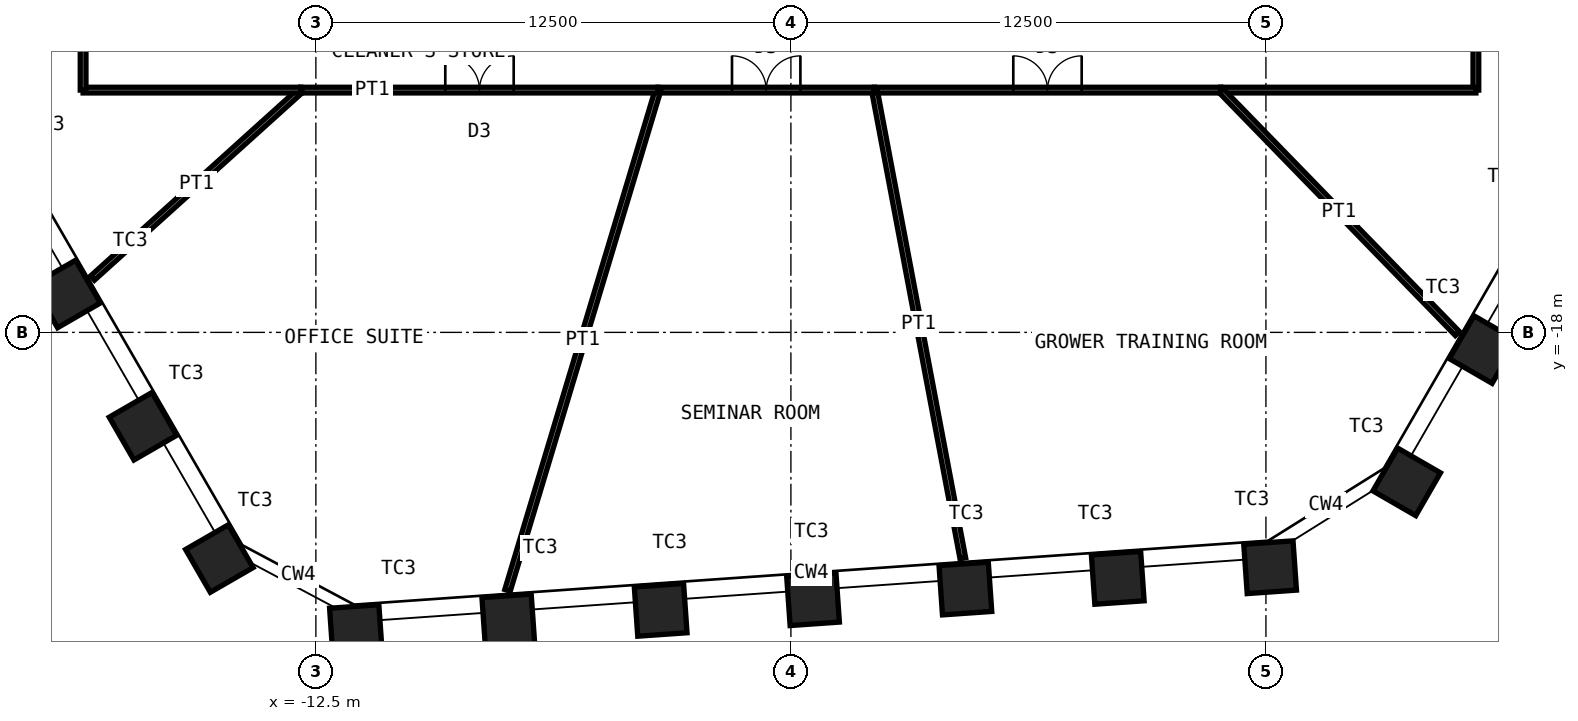
"""IFC4 building model, lengths in metres.
Left out: names, types, materials, properties, quantities, classifications, styles, units other than length and angle.
Written with IfcOpenShell. Run it as: python <this file> out.ifc"""

import sys

from ifc_helpers import new_model, si_unit, direction, frame, frame_2d, origin, origin_2d, place, context, subcontext, project, spatial, rectangle, hollow_rectangle, extrude, element, fill, save


model = new_model("IFC4")
c1 = context("Model", 3, precision=1e-05, world=origin(), true_north=direction((0.0, 1.0)))
c2 = subcontext(c1, "Body", "Model", "MODEL_VIEW")
j1 = project(units=[si_unit("LENGTHUNIT", "METRE"), si_unit("PLANEANGLEUNIT", "RADIAN")], contexts=[c1])
p1 = place(None, origin())
s1 = spatial("IfcSite", under=j1, at=p1, CompositionType="ELEMENT")
p2 = place(p1, origin())
s2 = spatial("IfcBuilding", under=s1, at=p2, CompositionType="ELEMENT")
p3 = place(p2, frame((0.0, 0.0, 132.4)))
s3 = spatial("IfcBuildingStorey", under=s2, at=p3, CompositionType="ELEMENT", Elevation=132.4)
for number, where, z_axis, x_axis in (
    (1, (18.214, -18.453, 0.0), (0.0, 0.0, 1.0), (0.5, 0.866, 0.0)),
    (2, (16.204, -21.933, 0.0), (0.0, 0.0, 1.0), (0.5, 0.866, 0.0)),
    (3, (12.61, -24.179, 0.0), (0.0, 0.0, 1.0), (0.998, 0.07, 0.0)),
    (4, (8.601, -24.46, 0.0), (0.0, 0.0, 1.0), (0.998, 0.07, 0.0)),
    (5, (4.592, -24.74, 0.0), (0.0, 0.0, 1.0), (0.998, 0.07, 0.0)),
    (6, (0.582, -25.02, 0.0), (0.0, 0.0, 1.0), (0.998, 0.07, 0.0)),
    (7, (-3.427, -25.301, 0.0), (0.0, 0.0, 1.0), (0.998, 0.07, 0.0)),
    (8, (-7.436, -25.581, 0.0), (0.0, 0.0, 1.0), (0.998, 0.07, 0.0)),
    (9, (-11.446, -25.861, 0.0), (0.0, 0.0, 1.0), (0.998, 0.07, 0.0)),
    (10, (-15.04, -23.95, 0.0), (0.0, 0.0, 1.0), (0.5, -0.866, 0.0)),
    (11, (-17.049, -20.47, 0.0), (0.0, 0.0, 1.0), (0.5, -0.866, 0.0)),
    (12, (-19.059, -16.989, 0.0), (0.0, 0.0, 1.0), (0.5, -0.866, 0.0)),
):
    element("IfcColumn", number, at=place(p3, frame(where, z_axis=z_axis, x_axis=x_axis)), inside=s3, PredefinedType="COLUMN", context=c2, shape_type="SweptSolid", body=[
        extrude(hollow_rectangle(XDim=1.3, YDim=1.3, WallThickness=0.1, at=origin_2d()), origin(), (0.0, 0.0, 1.0), 4.2),
    ])
p4 = place(p3, frame((18.025, 4.247, 0.0), z_axis=(0.0, 0.0, 1.0), x_axis=(0.0, -1.0, 0.0)))
e13 = element("IfcWall", 13, at=p4, inside=s3, PredefinedType="PARTITIONING", context=c2, shape_type="SweptSolid", body=[
    extrude(rectangle(XDim=15.872, YDim=0.15, at=frame_2d((7.936, 0.0))), origin(), (0.0, 0.0, 1.0), 4.03),
])
p5 = place(p4, frame((7.036, 0.0, 0.0)))
e14 = element("IfcOpeningElement", 14, at=p5, cuts=e13, PredefinedType="OPENING", context=c2, shape_type="SweptSolid", body=[
    extrude(rectangle(XDim=1.8, YDim=2.4, at=frame_2d((0.9, 1.2))), frame((0.0, 0.085, 0.0), z_axis=(0.0, -1.0, 0.0), x_axis=(1.0, 0.0, 0.0)), (0.0, 0.0, 1.0), 0.17),
])
p6 = place(p3, frame((18.025, -11.625, 0.0), z_axis=(0.0, 0.0, 1.0), x_axis=(-1.0, 0.0, 0.0)))
e15 = element("IfcWall", 15, at=p6, inside=s3, PredefinedType="PARTITIONING", context=c2, shape_type="SweptSolid", body=[
    extrude(rectangle(XDim=6.718, YDim=0.15, at=frame_2d((3.359, 0.0))), origin(), (0.0, 0.0, 1.0), 4.03),
])
p7 = place(p3, frame((17.538, -18.031, 0.0), z_axis=(0.0, 0.0, 1.0), x_axis=(-0.697230918085, 0.716846599257, 0.0)))
e16 = element("IfcWall", 16, at=p7, inside=s3, PredefinedType="PARTITIONING", context=c2, shape_type="SweptSolid", body=[
    extrude(rectangle(XDim=8.936, YDim=0.15, at=frame_2d((4.468, 0.0))), origin(), (0.0, 0.0, 1.0), 3.33),
])
p8 = place(p3, frame((11.307, -11.625, 0.0), z_axis=(0.0, 0.0, 1.0), x_axis=(-1.0, 0.0, 0.0)))
e17 = element("IfcWall", 17, at=p8, inside=s3, PredefinedType="PARTITIONING", context=c2, shape_type="SweptSolid", body=[
    extrude(rectangle(XDim=9.111, YDim=0.15, at=frame_2d((4.555, 0.0))), origin(), (0.0, 0.0, 1.0), 4.03),
])
p9 = place(p8, frame((3.655, 0.0, 0.0)))
e18 = element("IfcOpeningElement", 18, at=p9, cuts=e17, PredefinedType="OPENING", context=c2, shape_type="SweptSolid", body=[
    extrude(rectangle(XDim=1.8, YDim=2.4, at=frame_2d((0.9, 1.2))), frame((0.0, 0.085, 0.0), z_axis=(0.0, -1.0, 0.0), x_axis=(1.0, 0.0, 0.0)), (0.0, 0.0, 1.0), 0.17),
])
p10 = place(p3, frame((4.524, -23.943, 0.0), z_axis=(0.0, 0.0, 1.0), x_axis=(-0.185671124909, 0.98261194445, 0.0)))
e19 = element("IfcWall", 19, at=p10, inside=s3, PredefinedType="PARTITIONING", context=c2, shape_type="SweptSolid", body=[
    extrude(rectangle(XDim=12.536, YDim=0.15, at=frame_2d((6.268, 0.0))), origin(), (0.0, 0.0, 1.0), 3.33),
])
p11 = place(p3, frame((2.197, -11.625, 0.0), z_axis=(0.0, 0.0, 1.0), x_axis=(-1.0, 0.0, 0.0)))
e20 = element("IfcWall", 20, at=p11, inside=s3, PredefinedType="PARTITIONING", context=c2, shape_type="SweptSolid", body=[
    extrude(rectangle(XDim=5.694, YDim=0.15, at=frame_2d((2.847, 0.0))), origin(), (0.0, 0.0, 1.0), 4.03),
])
p12 = place(p11, frame((1.947, 0.0, 0.0)))
e21 = element("IfcOpeningElement", 21, at=p12, cuts=e20, PredefinedType="OPENING", context=c2, shape_type="SweptSolid", body=[
    extrude(rectangle(XDim=1.8, YDim=2.4, at=frame_2d((0.9, 1.2))), frame((0.0, 0.085, 0.0), z_axis=(0.0, -1.0, 0.0), x_axis=(1.0, 0.0, 0.0)), (0.0, 0.0, 1.0), 0.17),
])
p13 = place(p3, frame((-7.456, -24.787, 0.0), z_axis=(0.0, 0.0, 1.0), x_axis=(0.288055049501, 0.957613851433, 0.0)))
e22 = element("IfcWall", 22, at=p13, inside=s3, PredefinedType="PARTITIONING", context=c2, shape_type="SweptSolid", body=[
    extrude(rectangle(XDim=13.745, YDim=0.15, at=frame_2d((6.872, 0.0))), origin(), (0.0, 0.0, 1.0), 3.28),
])
p14 = place(p3, frame((-3.497, -11.625, 0.0), z_axis=(0.0, 0.0, 1.0), x_axis=(-1.0, 0.0, 0.0)))
e23 = element("IfcWall", 23, at=p14, inside=s3, PredefinedType="PARTITIONING", context=c2, shape_type="SweptSolid", body=[
    extrude(rectangle(XDim=9.395, YDim=0.15, at=frame_2d((4.698, 0.0))), origin(), (0.0, 0.0, 1.0), 4.03),
])
p15 = place(p14, frame((3.798, 0.0, 0.0)))
e24 = element("IfcOpeningElement", 24, at=p15, cuts=e23, PredefinedType="OPENING", context=c2, shape_type="SweptSolid", body=[
    extrude(rectangle(XDim=1.8, YDim=2.4, at=frame_2d((0.9, 1.2))), frame((0.0, 0.085, 0.0), z_axis=(0.0, -1.0, 0.0), x_axis=(1.0, 0.0, 0.0)), (0.0, 0.0, 1.0), 0.17),
])
p16 = place(p3, frame((-18.378, -16.572, 0.0), z_axis=(0.0, 0.0, 1.0), x_axis=(0.742666079924, 0.669661924951, 0.0)))
e25 = element("IfcWall", 25, at=p16, inside=s3, PredefinedType="PARTITIONING", context=c2, shape_type="SweptSolid", body=[
    extrude(rectangle(XDim=7.387, YDim=0.15, at=frame_2d((3.694, 0.0))), origin(), (0.0, 0.0, 1.0), 3.33),
])
p17 = place(p3, frame((-12.892, -11.625, 0.0), z_axis=(0.0, 0.0, 1.0), x_axis=(-1.0, 0.0, 0.0)))
e26 = element("IfcWall", 26, at=p17, inside=s3, PredefinedType="PARTITIONING", context=c2, shape_type="SweptSolid", body=[
    extrude(rectangle(XDim=5.733, YDim=0.15, at=frame_2d((2.866, 0.0))), origin(), (0.0, 0.0, 1.0), 4.03),
])
p18 = place(p3, frame((-18.625, -11.625, 0.0), z_axis=(0.0, 0.0, 1.0), x_axis=(0.0, 1.0, 0.0)))
e27 = element("IfcWall", 27, at=p18, inside=s3, PredefinedType="PARTITIONING", context=c2, shape_type="SweptSolid", body=[
    extrude(rectangle(XDim=6.91, YDim=0.15, at=frame_2d((3.455, 0.0))), origin(), (0.0, 0.0, 1.0), 4.03),
])
p19 = place(p18, frame((2.555, 0.0, 0.0)))
e28 = element("IfcOpeningElement", 28, at=p19, cuts=e27, PredefinedType="OPENING", context=c2, shape_type="SweptSolid", body=[
    extrude(rectangle(XDim=1.8, YDim=2.4, at=frame_2d((0.9, 1.2))), frame((0.0, 0.085, 0.0), z_axis=(0.0, -1.0, 0.0), x_axis=(1.0, 0.0, 0.0)), (0.0, 0.0, 1.0), 0.17),
])
p20 = place(p9, origin())
e29 = element("IfcDoor", 29, at=p20, inside=s3, OperationType="DOUBLE_DOOR_DOUBLE_SWING", PredefinedType="DOOR", context=c2, shape_type="SweptSolid", body=[
    extrude(rectangle(XDim=1.8, YDim=2.4, at=frame_2d((0.9, 1.2))), frame((0.0, 0.025, 0.0), z_axis=(0.0, -1.0, 0.0), x_axis=(1.0, 0.0, 0.0)), (0.0, 0.0, 1.0), 0.05),
])
fill(e18, e29)
p21 = place(p12, origin())
e30 = element("IfcDoor", 30, at=p21, inside=s3, OperationType="DOUBLE_DOOR_DOUBLE_SWING", PredefinedType="DOOR", context=c2, shape_type="SweptSolid", body=[
    extrude(rectangle(XDim=1.8, YDim=2.4, at=frame_2d((0.9, 1.2))), frame((0.0, 0.025, 0.0), z_axis=(0.0, -1.0, 0.0), x_axis=(1.0, 0.0, 0.0)), (0.0, 0.0, 1.0), 0.05),
])
fill(e21, e30)
p22 = place(p15, origin())
e31 = element("IfcDoor", 31, at=p22, inside=s3, OperationType="DOUBLE_DOOR_DOUBLE_SWING", PredefinedType="DOOR", context=c2, shape_type="SweptSolid", body=[
    extrude(rectangle(XDim=1.8, YDim=2.4, at=frame_2d((0.9, 1.2))), frame((0.0, 0.025, 0.0), z_axis=(0.0, -1.0, 0.0), x_axis=(1.0, 0.0, 0.0)), (0.0, 0.0, 1.0), 0.05),
])
fill(e24, e31)
save(model, sys.argv[1])
